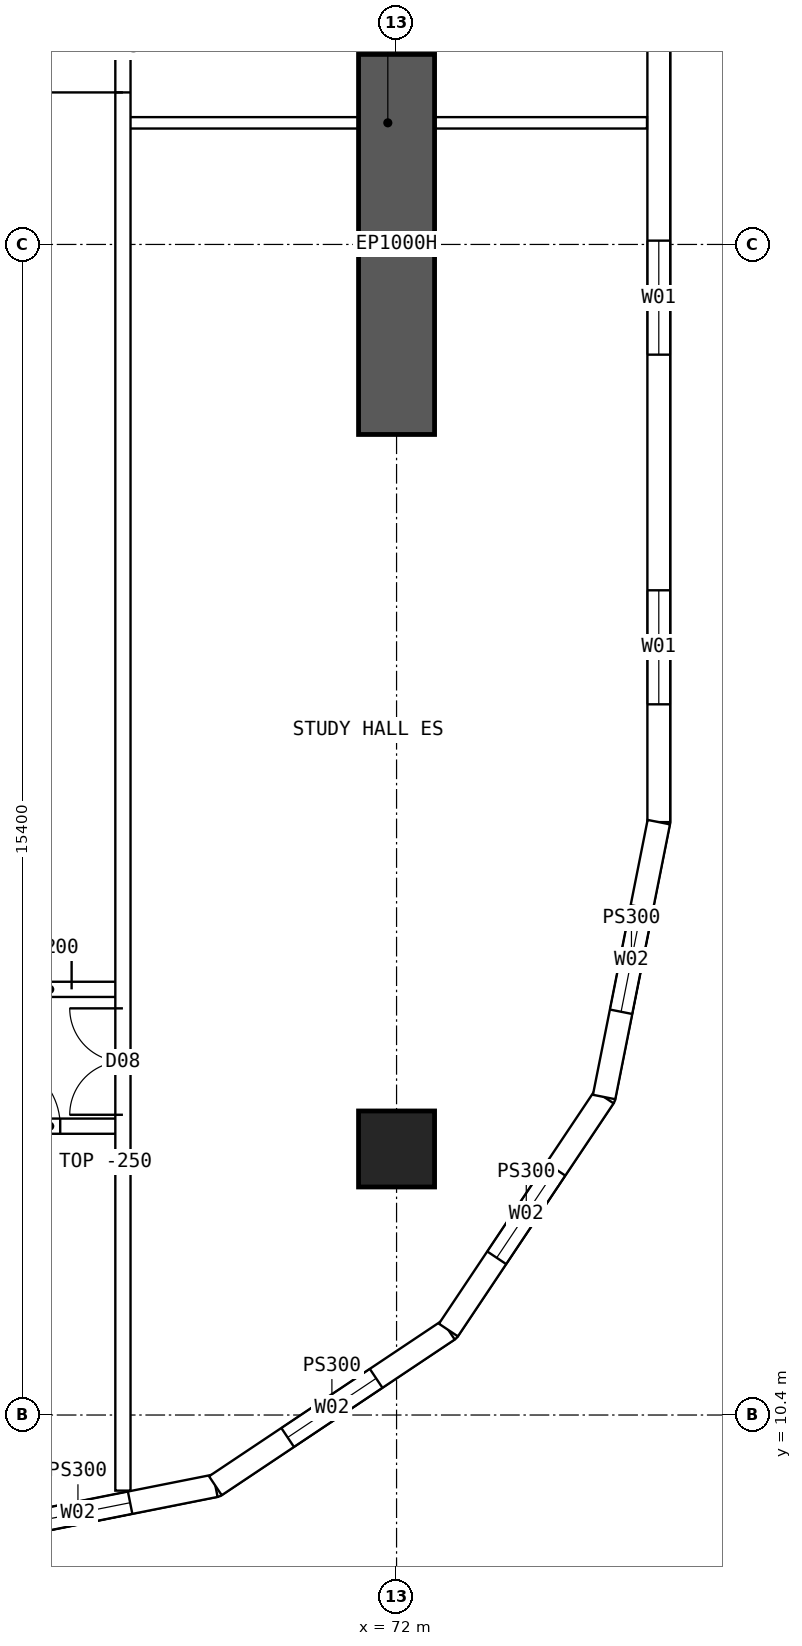
"""IFC4 building model, lengths in metres.
Left out: names, types, materials, properties, quantities, classifications, styles, units other than length and angle.
Written with IfcOpenShell. Run it as: python <this file> out.ifc"""

import sys

from ifc_helpers import new_model, si_unit, direction, frame, frame_2d, origin, origin_2d, place, context, subcontext, project, spatial, polyline, rectangle, hollow_rectangle, outline, extrude, element, fill, save


model = new_model("IFC4")
c1 = context("Model", 3, precision=1e-05, world=origin(), true_north=direction((0.0, 1.0)))
c2 = subcontext(c1, "Body", "Model", "MODEL_VIEW")
j1 = project(units=[si_unit("LENGTHUNIT", "METRE"), si_unit("PLANEANGLEUNIT", "RADIAN")], contexts=[c1])
p1 = place(None, origin())
s1 = spatial("IfcSite", under=j1, at=p1, CompositionType="ELEMENT")
p2 = place(p1, origin())
s2 = spatial("IfcBuilding", under=s1, at=p2, CompositionType="ELEMENT")
p3 = place(p2, frame((0.0, 0.0, 91.9)))
s3 = spatial("IfcBuildingStorey", under=s2, at=p3, CompositionType="ELEMENT", Elevation=91.9)
p4 = place(p3, frame((72.0, 13.9, 0.0), z_axis=(0.0, 0.0, 1.0), x_axis=(1.0, 0.0, 0.0)))
e1 = element("IfcColumn", 1, at=p4, inside=s3, PredefinedType="COLUMN", context=c2, shape_type="SweptSolid", body=[
    extrude(hollow_rectangle(XDim=1.0, YDim=1.0, WallThickness=0.1, at=origin_2d()), origin(), (0.0, 0.0, 1.0), 3.75),
])
p5 = place(p3, frame((72.0, 23.3, 0.0), z_axis=(0.0, 0.0, 1.0), x_axis=(0.0, 1.0, 0.0)))
e2 = element("IfcWall", 2, at=p5, inside=s3, PredefinedType="SHEAR", context=c2, shape_type="SweptSolid", body=[
    extrude(rectangle(XDim=5.0, YDim=1.0, at=frame_2d((2.5, 0.0))), origin(), (0.0, 0.0, 1.0), 3.75),
])
p6 = place(p3, frame((75.45, 18.2, 0.0), z_axis=(0.0, 0.0, 1.0), x_axis=(0.0, 1.0, 0.0)))
e3 = element("IfcWall", 3, at=p6, inside=s3, PredefinedType="SOLIDWALL", context=c2, shape_type="SweptSolid", body=[
    extrude(outline(polyline([(-0.015, -0.15), (27.615, -0.15), (27.585, 0.15), (0.015, 0.15), (-0.015, -0.15)])), origin(), (0.0, 0.0, 1.0), 3.5),
])
p7 = place(p6, frame((1.55, 0.0, 0.9)))
e4 = element("IfcOpeningElement", 4, at=p7, cuts=e3, PredefinedType="OPENING", context=c2, shape_type="SweptSolid", body=[
    extrude(rectangle(XDim=1.5, YDim=2.0, at=frame_2d((0.75, 1.0))), frame((0.0, 0.16, 0.0), z_axis=(0.0, -1.0, 0.0), x_axis=(1.0, 0.0, 0.0)), (0.0, 0.0, 1.0), 0.32),
])
p8 = place(p6, frame((6.15, 0.0, 0.9)))
e5 = element("IfcOpeningElement", 5, at=p8, cuts=e3, PredefinedType="OPENING", context=c2, shape_type="SweptSolid", body=[
    extrude(rectangle(XDim=1.5, YDim=2.0, at=frame_2d((0.75, 1.0))), frame((0.0, 0.16, 0.0), z_axis=(0.0, -1.0, 0.0), x_axis=(1.0, 0.0, 0.0)), (0.0, 0.0, 1.0), 0.32),
])
p9 = place(p6, frame((10.75, 0.0, 0.9)))
e6 = element("IfcOpeningElement", 6, at=p9, cuts=e3, PredefinedType="OPENING", context=c2, shape_type="SweptSolid", body=[
    extrude(rectangle(XDim=1.5, YDim=2.0, at=frame_2d((0.75, 1.0))), frame((0.0, 0.16, 0.0), z_axis=(0.0, -1.0, 0.0), x_axis=(1.0, 0.0, 0.0)), (0.0, 0.0, 1.0), 0.32),
])
p10 = place(p6, frame((15.35, 0.0, 0.9)))
e7 = element("IfcOpeningElement", 7, at=p10, cuts=e3, PredefinedType="OPENING", context=c2, shape_type="SweptSolid", body=[
    extrude(rectangle(XDim=1.5, YDim=2.0, at=frame_2d((0.75, 1.0))), frame((0.0, 0.16, 0.0), z_axis=(0.0, -1.0, 0.0), x_axis=(1.0, 0.0, 0.0)), (0.0, 0.0, 1.0), 0.32),
])
p11 = place(p6, frame((19.95, 0.0, 0.9)))
e8 = element("IfcOpeningElement", 8, at=p11, cuts=e3, PredefinedType="OPENING", context=c2, shape_type="SweptSolid", body=[
    extrude(rectangle(XDim=1.5, YDim=2.0, at=frame_2d((0.75, 1.0))), frame((0.0, 0.16, 0.0), z_axis=(0.0, -1.0, 0.0), x_axis=(1.0, 0.0, 0.0)), (0.0, 0.0, 1.0), 0.32),
])
p12 = place(p6, frame((24.55, 0.0, 0.9)))
e9 = element("IfcOpeningElement", 9, at=p12, cuts=e3, PredefinedType="OPENING", context=c2, shape_type="SweptSolid", body=[
    extrude(rectangle(XDim=1.5, YDim=2.0, at=frame_2d((0.75, 1.0))), frame((0.0, 0.16, 0.0), z_axis=(0.0, -1.0, 0.0), x_axis=(1.0, 0.0, 0.0)), (0.0, 0.0, 1.0), 0.32),
])
p13 = place(p3, frame((66.0, 8.75, 0.0), z_axis=(0.0, 0.0, 1.0), x_axis=(0.980791473772, 0.195059183267, 0.0)))
e10 = element("IfcWall", 10, at=p13, inside=s3, PredefinedType="SOLIDWALL", context=c2, shape_type="SweptSolid", body=[
    extrude(outline(polyline([(-0.03, -0.15), (3.717, -0.15), (3.657, 0.15), (0.03, 0.15), (-0.03, -0.15)])), origin(), (0.0, 0.0, 1.0), 3.5),
])
p14 = place(p13, frame((1.144, 0.0, 0.9)))
e11 = element("IfcOpeningElement", 11, at=p14, cuts=e10, PredefinedType="OPENING", context=c2, shape_type="SweptSolid", body=[
    extrude(rectangle(XDim=1.4, YDim=1.8, at=frame_2d((0.7, 0.9))), frame((0.0, 0.16, 0.0), z_axis=(0.0, -1.0, 0.0), x_axis=(1.0, 0.0, 0.0)), (0.0, 0.0, 1.0), 0.32),
])
p15 = place(p3, frame((69.616, 9.469, 0.0), z_axis=(0.0, 0.0, 1.0), x_axis=(0.831448786846, 0.555601399253, 0.0)))
e12 = element("IfcWall", 12, at=p15, inside=s3, PredefinedType="SOLIDWALL", context=c2, shape_type="SweptSolid", body=[
    extrude(outline(polyline([(-0.03, -0.15), (3.717, -0.15), (3.657, 0.15), (0.03, 0.15), (-0.03, -0.15)])), origin(), (0.0, 0.0, 1.0), 3.5),
])
p16 = place(p15, frame((1.144, 0.0, 0.9)))
e13 = element("IfcOpeningElement", 13, at=p16, cuts=e12, PredefinedType="OPENING", context=c2, shape_type="SweptSolid", body=[
    extrude(rectangle(XDim=1.4, YDim=1.8, at=frame_2d((0.7, 0.9))), frame((0.0, 0.16, 0.0), z_axis=(0.0, -1.0, 0.0), x_axis=(1.0, 0.0, 0.0)), (0.0, 0.0, 1.0), 0.32),
])
p17 = place(p3, frame((72.682, 11.518, 0.0), z_axis=(0.0, 0.0, 1.0), x_axis=(0.555601399253, 0.831448786846, 0.0)))
e14 = element("IfcWall", 14, at=p17, inside=s3, PredefinedType="SOLIDWALL", context=c2, shape_type="SweptSolid", body=[
    extrude(outline(polyline([(-0.03, -0.15), (3.717, -0.15), (3.657, 0.15), (0.03, 0.15), (-0.03, -0.15)])), origin(), (0.0, 0.0, 1.0), 3.5),
])
p18 = place(p17, frame((1.144, 0.0, 0.9)))
e15 = element("IfcOpeningElement", 15, at=p18, cuts=e14, PredefinedType="OPENING", context=c2, shape_type="SweptSolid", body=[
    extrude(rectangle(XDim=1.4, YDim=1.8, at=frame_2d((0.7, 0.9))), frame((0.0, 0.16, 0.0), z_axis=(0.0, -1.0, 0.0), x_axis=(1.0, 0.0, 0.0)), (0.0, 0.0, 1.0), 0.32),
])
p19 = place(p3, frame((74.731, 14.583, 0.0), z_axis=(0.0, 0.0, 1.0), x_axis=(0.195059183267, 0.980791473772, 0.0)))
e16 = element("IfcWall", 16, at=p19, inside=s3, PredefinedType="SOLIDWALL", context=c2, shape_type="SweptSolid", body=[
    extrude(outline(polyline([(-0.03, -0.15), (3.702, -0.15), (3.672, 0.15), (0.03, 0.15), (-0.03, -0.15)])), origin(), (0.0, 0.0, 1.0), 3.5),
])
p20 = place(p19, frame((1.144, 0.0, 0.9)))
e17 = element("IfcOpeningElement", 17, at=p20, cuts=e16, PredefinedType="OPENING", context=c2, shape_type="SweptSolid", body=[
    extrude(rectangle(XDim=1.4, YDim=1.8, at=frame_2d((0.7, 0.9))), frame((0.0, 0.16, 0.0), z_axis=(0.0, -1.0, 0.0), x_axis=(1.0, 0.0, 0.0)), (0.0, 0.0, 1.0), 0.32),
])
p21 = place(p3, frame((66.475, 14.2, 0.0), z_axis=(0.0, 0.0, 1.0), x_axis=(1.0, 0.0, 0.0)))
e18 = element("IfcWall", 18, at=p21, inside=s3, PredefinedType="SOLIDWALL", context=c2, shape_type="SweptSolid", body=[
    extrude(rectangle(XDim=1.925, YDim=0.2, at=frame_2d((0.962, 0.0))), origin(), (0.0, 0.0, 1.0), 3.5),
])
p22 = place(p21, frame((0.2, 0.0, 0.0)))
e19 = element("IfcOpeningElement", 19, at=p22, cuts=e18, PredefinedType="OPENING", context=c2, shape_type="SweptSolid", body=[
    extrude(rectangle(XDim=0.9, YDim=2.1, at=frame_2d((0.45, 1.05))), frame((0.0, 0.11, 0.0), z_axis=(0.0, -1.0, 0.0), x_axis=(1.0, 0.0, 0.0)), (0.0, 0.0, 1.0), 0.22),
])
p23 = place(p3, frame((66.475, 16.0, 0.0), z_axis=(0.0, 0.0, 1.0), x_axis=(1.0, 0.0, 0.0)))
e20 = element("IfcWall", 20, at=p23, inside=s3, PredefinedType="SOLIDWALL", context=c2, shape_type="SweptSolid", body=[
    extrude(rectangle(XDim=1.925, YDim=0.2, at=frame_2d((0.962, 0.0))), origin(), (0.0, 0.0, 1.0), 3.5),
])
p24 = place(p23, frame((0.05, 0.0, 0.0)))
e21 = element("IfcOpeningElement", 21, at=p24, cuts=e20, PredefinedType="OPENING", context=c2, shape_type="SweptSolid", body=[
    extrude(rectangle(XDim=1.2, YDim=2.1, at=frame_2d((0.6, 1.05))), frame((0.0, 0.11, 0.0), z_axis=(0.0, -1.0, 0.0), x_axis=(1.0, 0.0, 0.0)), (0.0, 0.0, 1.0), 0.22),
])
p25 = place(p3, frame((68.4, 9.405, 0.0), z_axis=(0.0, 0.0, 1.0), x_axis=(0.0, 1.0, 0.0)))
e22 = element("IfcWall", 22, at=p25, inside=s3, PredefinedType="SOLIDWALL", context=c2, shape_type="SweptSolid", body=[
    extrude(rectangle(XDim=45.189, YDim=0.2, at=frame_2d((22.595, 0.0))), origin(), (0.0, 0.0, 1.0), 3.5),
])
p26 = place(p25, frame((18.395, 0.0, 0.0)))
e23 = element("IfcOpeningElement", 23, at=p26, cuts=e22, PredefinedType="OPENING", context=c2, shape_type="SweptSolid", body=[
    extrude(rectangle(XDim=1.2, YDim=2.1, at=frame_2d((0.6, 1.05))), frame((0.0, 0.11, 0.0), z_axis=(0.0, -1.0, 0.0), x_axis=(1.0, 0.0, 0.0)), (0.0, 0.0, 1.0), 0.22),
])
p27 = place(p25, frame((30.195, 0.0, 0.0)))
e24 = element("IfcOpeningElement", 24, at=p27, cuts=e22, PredefinedType="OPENING", context=c2, shape_type="SweptSolid", body=[
    extrude(rectangle(XDim=1.2, YDim=2.1, at=frame_2d((0.6, 1.05))), frame((0.0, 0.11, 0.0), z_axis=(0.0, -1.0, 0.0), x_axis=(1.0, 0.0, 0.0)), (0.0, 0.0, 1.0), 0.22),
])
p28 = place(p25, frame((4.945, 0.0, 0.0)))
e25 = element("IfcOpeningElement", 25, at=p28, cuts=e22, PredefinedType="OPENING", context=c2, shape_type="SweptSolid", body=[
    extrude(rectangle(XDim=1.4, YDim=2.1, at=frame_2d((0.7, 1.05))), frame((0.0, 0.11, 0.0), z_axis=(0.0, -1.0, 0.0), x_axis=(1.0, 0.0, 0.0)), (0.0, 0.0, 1.0), 0.22),
])
p29 = place(p25, frame((38.745, 0.0, 0.0)))
e26 = element("IfcOpeningElement", 26, at=p29, cuts=e22, PredefinedType="OPENING", context=c2, shape_type="SweptSolid", body=[
    extrude(rectangle(XDim=1.4, YDim=2.1, at=frame_2d((0.7, 1.05))), frame((0.0, 0.11, 0.0), z_axis=(0.0, -1.0, 0.0), x_axis=(1.0, 0.0, 0.0)), (0.0, 0.0, 1.0), 0.22),
])
p30 = place(p3, frame((68.475, 27.4, 0.0), z_axis=(0.0, 0.0, 1.0), x_axis=(1.0, 0.0, 0.0)))
e27 = element("IfcWall", 27, at=p30, inside=s3, PredefinedType="PARTITIONING", context=c2, shape_type="SweptSolid", body=[
    extrude(rectangle(XDim=6.82, YDim=0.15, at=frame_2d((3.41, 0.0))), origin(), (0.0, 0.0, 1.0), 3.5),
])
p31 = place(p7, origin())
e28 = element("IfcWindow", 28, at=p31, inside=s3, PartitioningType="SINGLE_PANEL", PredefinedType="WINDOW", context=c2, shape_type="SweptSolid", body=[
    extrude(rectangle(XDim=1.5, YDim=2.0, at=frame_2d((0.75, 1.0))), frame((0.0, 0.03, 0.0), z_axis=(0.0, -1.0, 0.0), x_axis=(1.0, 0.0, 0.0)), (0.0, 0.0, 1.0), 0.06),
])
fill(e4, e28)
p32 = place(p8, origin())
e29 = element("IfcWindow", 29, at=p32, inside=s3, PartitioningType="SINGLE_PANEL", PredefinedType="WINDOW", context=c2, shape_type="SweptSolid", body=[
    extrude(rectangle(XDim=1.5, YDim=2.0, at=frame_2d((0.75, 1.0))), frame((0.0, 0.03, 0.0), z_axis=(0.0, -1.0, 0.0), x_axis=(1.0, 0.0, 0.0)), (0.0, 0.0, 1.0), 0.06),
])
fill(e5, e29)
p33 = place(p14, origin())
e30 = element("IfcWindow", 30, at=p33, inside=s3, PartitioningType="SINGLE_PANEL", PredefinedType="WINDOW", context=c2, shape_type="SweptSolid", body=[
    extrude(rectangle(XDim=1.4, YDim=1.8, at=frame_2d((0.7, 0.9))), frame((0.0, 0.03, 0.0), z_axis=(0.0, -1.0, 0.0), x_axis=(1.0, 0.0, 0.0)), (0.0, 0.0, 1.0), 0.06),
])
fill(e11, e30)
p34 = place(p16, origin())
e31 = element("IfcWindow", 31, at=p34, inside=s3, PartitioningType="SINGLE_PANEL", PredefinedType="WINDOW", context=c2, shape_type="SweptSolid", body=[
    extrude(rectangle(XDim=1.4, YDim=1.8, at=frame_2d((0.7, 0.9))), frame((0.0, 0.03, 0.0), z_axis=(0.0, -1.0, 0.0), x_axis=(1.0, 0.0, 0.0)), (0.0, 0.0, 1.0), 0.06),
])
fill(e13, e31)
p35 = place(p18, origin())
e32 = element("IfcWindow", 32, at=p35, inside=s3, PartitioningType="SINGLE_PANEL", PredefinedType="WINDOW", context=c2, shape_type="SweptSolid", body=[
    extrude(rectangle(XDim=1.4, YDim=1.8, at=frame_2d((0.7, 0.9))), frame((0.0, 0.03, 0.0), z_axis=(0.0, -1.0, 0.0), x_axis=(1.0, 0.0, 0.0)), (0.0, 0.0, 1.0), 0.06),
])
fill(e15, e32)
p36 = place(p20, origin())
e33 = element("IfcWindow", 33, at=p36, inside=s3, PartitioningType="SINGLE_PANEL", PredefinedType="WINDOW", context=c2, shape_type="SweptSolid", body=[
    extrude(rectangle(XDim=1.4, YDim=1.8, at=frame_2d((0.7, 0.9))), frame((0.0, 0.03, 0.0), z_axis=(0.0, -1.0, 0.0), x_axis=(1.0, 0.0, 0.0)), (0.0, 0.0, 1.0), 0.06),
])
fill(e17, e33)
p37 = place(p24, origin())
e34 = element("IfcDoor", 34, at=p37, inside=s3, OperationType="DOUBLE_DOOR_SINGLE_SWING", PredefinedType="DOOR", context=c2, shape_type="SweptSolid", body=[
    extrude(rectangle(XDim=1.2, YDim=2.1, at=frame_2d((0.6, 1.05))), frame((0.0, 0.025, 0.0), z_axis=(0.0, -1.0, 0.0), x_axis=(1.0, 0.0, 0.0)), (0.0, 0.0, 1.0), 0.05),
])
fill(e21, e34)
p38 = place(p26, origin())
e35 = element("IfcDoor", 35, at=p38, inside=s3, OperationType="SINGLE_SWING_LEFT", PredefinedType="DOOR", context=c2, shape_type="SweptSolid", body=[
    extrude(rectangle(XDim=1.2, YDim=2.1, at=frame_2d((0.6, 1.05))), frame((0.0, 0.025, 0.0), z_axis=(0.0, -1.0, 0.0), x_axis=(1.0, 0.0, 0.0)), (0.0, 0.0, 1.0), 0.05),
])
fill(e23, e35)
p39 = place(p28, origin())
e36 = element("IfcDoor", 36, at=p39, inside=s3, OperationType="DOUBLE_DOOR_SINGLE_SWING", PredefinedType="DOOR", context=c2, shape_type="SweptSolid", body=[
    extrude(rectangle(XDim=1.4, YDim=2.1, at=frame_2d((0.7, 1.05))), frame((0.0, 0.025, 0.0), z_axis=(0.0, -1.0, 0.0), x_axis=(1.0, 0.0, 0.0)), (0.0, 0.0, 1.0), 0.05),
])
fill(e25, e36)
p40 = place(p22, origin())
e37 = element("IfcDoor", 37, at=p40, inside=s3, OperationType="SINGLE_SWING_LEFT", PredefinedType="DOOR", context=c2, shape_type="SweptSolid", body=[
    extrude(rectangle(XDim=0.9, YDim=2.1, at=frame_2d((0.45, 1.05))), frame((0.0, 0.025, 0.0), z_axis=(0.0, -1.0, 0.0), x_axis=(1.0, 0.0, 0.0)), (0.0, 0.0, 1.0), 0.05),
])
fill(e19, e37)
save(model, sys.argv[1])
